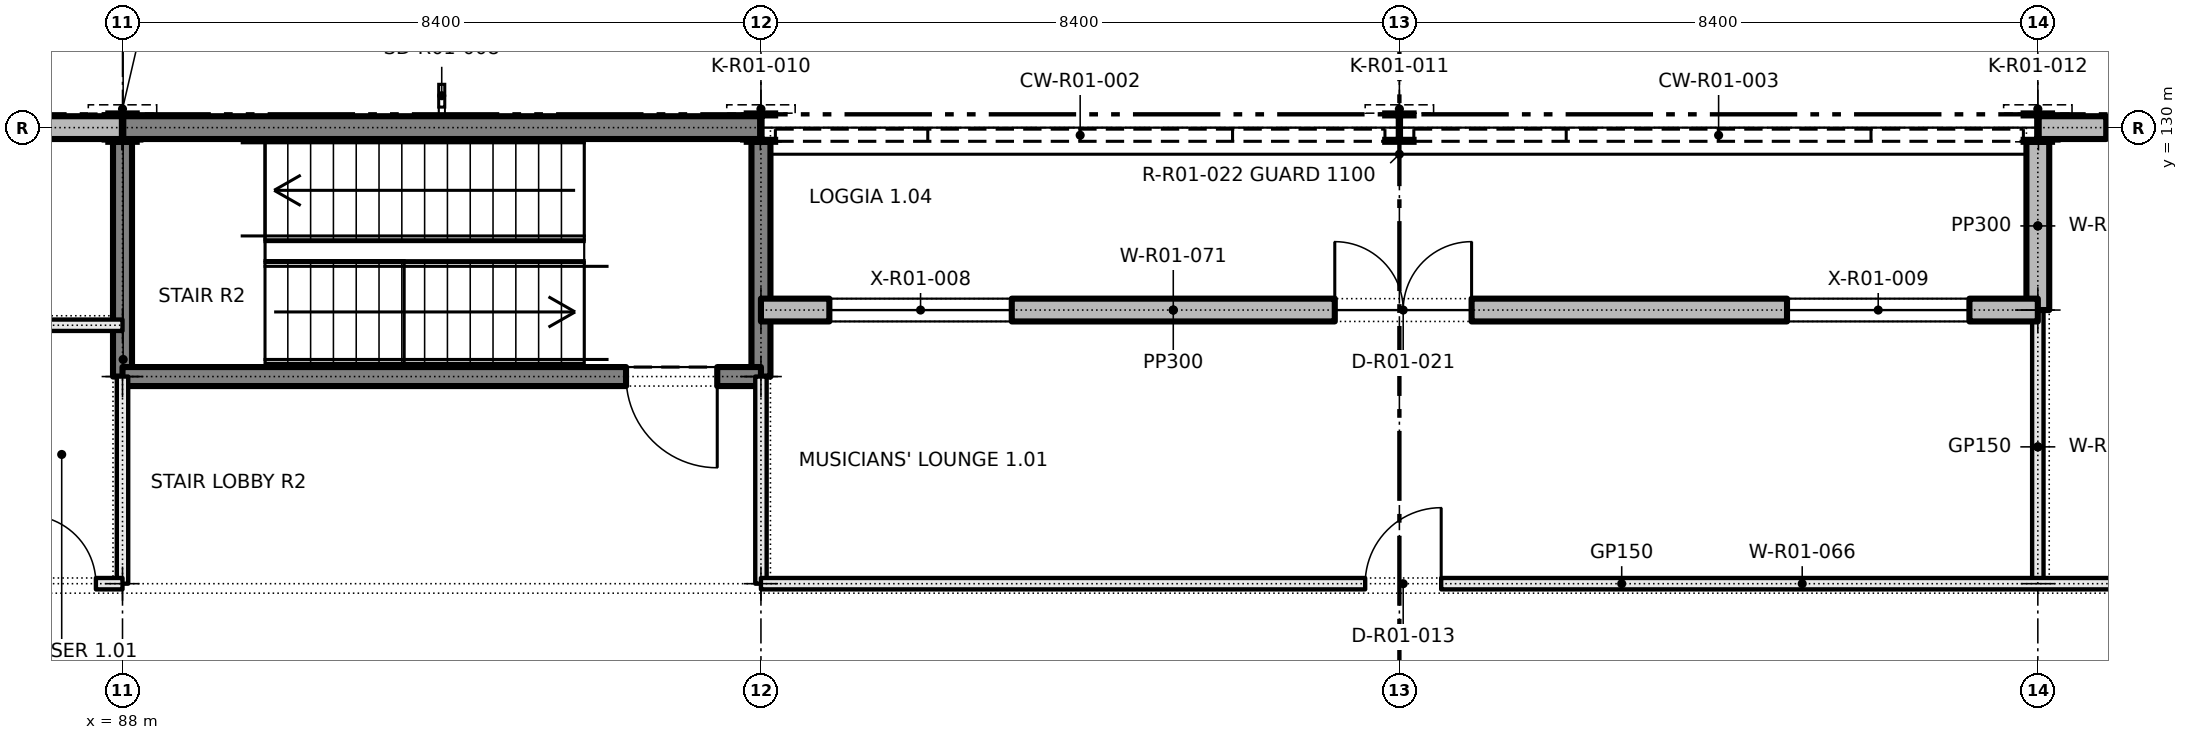
"""IFC4 building model, lengths in metres.
Left out: names, types, materials, properties, quantities, classifications, styles, units other than length and angle.
Written with IfcOpenShell. Run it as: python <this file> out.ifc"""

import sys

from ifc_helpers import new_model, si_unit, direction, frame, frame_2d, origin, origin_2d, place, context, subcontext, project, spatial, rectangle, i_section, extrude, element, fill, save


model = new_model("IFC4")
c1 = context("Model", 3, precision=1e-05, world=origin(), true_north=direction((0.0, 1.0)))
c2 = subcontext(c1, "Body", "Model", "MODEL_VIEW")
j1 = project(units=[si_unit("LENGTHUNIT", "METRE"), si_unit("PLANEANGLEUNIT", "RADIAN")], contexts=[c1])
p1 = place(None, origin())
s1 = spatial("IfcSite", under=j1, at=p1, CompositionType="ELEMENT")
p2 = place(p1, origin())
s2 = spatial("IfcBuilding", under=s1, at=p2, CompositionType="ELEMENT")
p3 = place(p2, frame((0.0, 0.0, 5.4)))
s3 = spatial("IfcBuildingStorey", under=s2, at=p3, CompositionType="ELEMENT", Elevation=5.4)
for number, where, z_axis, x_axis in (
    (1, (88.0, 130.0, 0.0), (0.0, 0.0, 1.0), (1.0, 0.0, 0.0)),
    (2, (96.4, 130.0, 0.0), (0.0, 0.0, 1.0), (1.0, 0.0, 0.0)),
    (3, (104.8, 130.0, 0.0), (0.0, 0.0, 1.0), (1.0, 0.0, 0.0)),
    (4, (113.2, 130.0, 0.0), (0.0, 0.0, 1.0), (1.0, 0.0, 0.0)),
):
    element("IfcColumn", number, at=place(p3, frame(where, z_axis=z_axis, x_axis=x_axis)), inside=s3, PredefinedType="COLUMN", context=c2, shape_type="SweptSolid", body=[
        extrude(i_section(OverallWidth=0.373, OverallDepth=0.373, WebThickness=0.016, FlangeThickness=0.026, FilletRadius=0.015, at=origin_2d()), origin(), (0.0, 0.0, 1.0), 4.8),
    ])
for number, where, z_axis, x_axis in (
    (5, (88.0, 126.725, 0.0), (0.0, 0.0, 1.0), (0.0, 1.0, 0.0)),
    (6, (96.4, 126.725, 0.0), (0.0, 0.0, 1.0), (0.0, 1.0, 0.0)),
):
    element("IfcWall", number, at=place(p3, frame(where, z_axis=z_axis, x_axis=x_axis)), inside=s3, PredefinedType="SHEAR", context=c2, shape_type="SweptSolid", body=[
        extrude(rectangle(XDim=3.088, YDim=0.25, at=frame_2d((1.544, 0.0))), origin(), (0.0, 0.0, 1.0), 4.8),
    ])
p4 = place(p3, frame((88.0, 126.725, 0.0), z_axis=(0.0, 0.0, 1.0), x_axis=(1.0, 0.0, 0.0)))
e7 = element("IfcWall", 7, at=p4, inside=s3, PredefinedType="SHEAR", context=c2, shape_type="SweptSolid", body=[
    extrude(rectangle(XDim=8.4, YDim=0.25, at=frame_2d((4.2, 0.0))), origin(), (0.0, 0.0, 1.0), 4.8),
])
p5 = place(p4, frame((6.625, 0.0, 0.0)))
e8 = element("IfcOpeningElement", 8, at=p5, cuts=e7, PredefinedType="OPENING", context=c2, shape_type="SweptSolid", body=[
    extrude(rectangle(XDim=1.2, YDim=2.1, at=frame_2d((0.6, 1.05))), frame((0.0, 0.135, 0.0), z_axis=(0.0, -1.0, 0.0), x_axis=(1.0, 0.0, 0.0)), (0.0, 0.0, 1.0), 0.27),
])
p6 = place(p3, frame((87.992, 130.0, 0.0), z_axis=(0.0, 0.0, 1.0), x_axis=(1.0, 0.0, 0.0)))
e9 = element("IfcWall", 9, at=p6, inside=s3, PredefinedType="SHEAR", context=c2, shape_type="SweptSolid", body=[
    extrude(rectangle(XDim=8.4, YDim=0.3, at=frame_2d((4.2, 0.0))), origin(), (0.0, 0.0, 1.0), 4.8),
])
p7 = place(p3, frame((79.592, 130.0, 0.0), z_axis=(0.0, 0.0, 1.0), x_axis=(1.0, 0.0, 0.0)))
e10 = element("IfcWall", 10, at=p7, inside=s3, PredefinedType="SOLIDWALL", context=c2, shape_type="SweptSolid", body=[
    extrude(rectangle(XDim=8.417, YDim=0.3, at=frame_2d((4.208, 0.0))), origin(), (0.0, 0.0, 1.0), 4.008),
])
p8 = place(p3, frame((113.208, 130.0, 0.0), z_axis=(0.0, 0.0, 1.0), x_axis=(1.0, 0.0, 0.0)))
e11 = element("IfcWall", 11, at=p8, inside=s3, PredefinedType="SOLIDWALL", context=c2, shape_type="SweptSolid", body=[
    extrude(rectangle(XDim=8.384, YDim=0.3, at=frame_2d((4.192, 0.0))), origin(), (0.0, 0.0, 1.0), 4.008),
])
p9 = place(p8, frame((0.892, 0.0, 0.95)))
e12 = element("IfcOpeningElement", 12, at=p9, cuts=e11, PredefinedType="OPENING", context=c2, shape_type="SweptSolid", body=[
    extrude(rectangle(XDim=2.4, YDim=1.8, at=frame_2d((1.2, 0.9))), frame((0.0, 0.16, 0.0), z_axis=(0.0, -1.0, 0.0), x_axis=(1.0, 0.0, 0.0)), (0.0, 0.0, 1.0), 0.32),
])
p10 = place(p8, frame((5.092, 0.0, 0.95)))
e13 = element("IfcOpeningElement", 13, at=p10, cuts=e11, PredefinedType="OPENING", context=c2, shape_type="SweptSolid", body=[
    extrude(rectangle(XDim=2.4, YDim=1.8, at=frame_2d((1.2, 0.9))), frame((0.0, 0.16, 0.0), z_axis=(0.0, -1.0, 0.0), x_axis=(1.0, 0.0, 0.0)), (0.0, 0.0, 1.0), 0.32),
])
for number, where, z_axis, x_axis in (
    (14, (88.0, 124.0, 0.0), (0.0, 0.0, 1.0), (0.0, 1.0, 0.0)),
    (15, (96.4, 124.0, 0.0), (0.0, 0.0, 1.0), (0.0, 1.0, 0.0)),
):
    element("IfcWall", number, at=place(p3, frame(where, z_axis=z_axis, x_axis=x_axis)), inside=s3, PredefinedType="PARTITIONING", context=c2, shape_type="SweptSolid", body=[
        extrude(rectangle(XDim=2.725, YDim=0.15, at=frame_2d((1.363, 0.0))), origin(), (0.0, 0.0, 1.0), 4.087),
    ])
p11 = place(p3, frame((113.2, 124.0, 0.0), z_axis=(0.0, 0.0, 1.0), x_axis=(0.0, 1.0, 0.0)))
e16 = element("IfcWall", 16, at=p11, inside=s3, PredefinedType="PARTITIONING", context=c2, shape_type="SweptSolid", body=[
    extrude(rectangle(XDim=3.6, YDim=0.15, at=frame_2d((1.8, 0.0))), origin(), (0.0, 0.0, 1.0), 4.087),
])
p12 = place(p3, frame((113.2, 127.6, 0.0), z_axis=(0.0, 0.0, 1.0), x_axis=(0.0, 1.0, 0.0)))
e17 = element("IfcWall", 17, at=p12, inside=s3, PredefinedType="SOLIDWALL", context=c2, shape_type="SweptSolid", body=[
    extrude(rectangle(XDim=2.213, YDim=0.3, at=frame_2d((1.106, 0.0))), origin(), (0.0, 0.0, 1.0), 4.087),
])
p13 = place(p3, frame((96.4, 124.0, 0.0), z_axis=(0.0, 0.0, 1.0), x_axis=(1.0, 0.0, 0.0)))
e18 = element("IfcWall", 18, at=p13, inside=s3, PredefinedType="PARTITIONING", context=c2, shape_type="SweptSolid", body=[
    extrude(rectangle(XDim=25.2, YDim=0.15, at=frame_2d((12.6, 0.0))), origin(), (0.0, 0.0, 1.0), 4.8),
])
p14 = place(p13, frame((7.95, 0.0, 0.0)))
e19 = element("IfcOpeningElement", 19, at=p14, cuts=e18, PredefinedType="OPENING", context=c2, shape_type="SweptSolid", body=[
    extrude(rectangle(XDim=1.0, YDim=2.1, at=frame_2d((0.5, 1.05))), frame((0.0, 0.085, 0.0), z_axis=(0.0, -1.0, 0.0), x_axis=(1.0, 0.0, 0.0)), (0.0, 0.0, 1.0), 0.17),
])
p15 = place(p13, frame((18.45, 0.0, 0.0)))
e20 = element("IfcOpeningElement", 20, at=p15, cuts=e18, PredefinedType="OPENING", context=c2, shape_type="SweptSolid", body=[
    extrude(rectangle(XDim=1.0, YDim=2.1, at=frame_2d((0.5, 1.05))), frame((0.0, 0.085, 0.0), z_axis=(0.0, -1.0, 0.0), x_axis=(1.0, 0.0, 0.0)), (0.0, 0.0, 1.0), 0.17),
])
p16 = place(p13, frame((22.55, 0.0, 0.0)))
e21 = element("IfcOpeningElement", 21, at=p16, cuts=e18, PredefinedType="OPENING", context=c2, shape_type="SweptSolid", body=[
    extrude(rectangle(XDim=1.0, YDim=2.1, at=frame_2d((0.5, 1.05))), frame((0.0, 0.085, 0.0), z_axis=(0.0, -1.0, 0.0), x_axis=(1.0, 0.0, 0.0)), (0.0, 0.0, 1.0), 0.17),
])
p17 = place(p3, frame((86.4, 124.0, 0.0), z_axis=(0.0, 0.0, 1.0), x_axis=(1.0, 0.0, 0.0)))
e22 = element("IfcWall", 22, at=p17, inside=s3, PredefinedType="PARTITIONING", context=c2, shape_type="SweptSolid", body=[
    extrude(rectangle(XDim=1.6, YDim=0.15, at=frame_2d((0.8, 0.0))), origin(), (0.0, 0.0, 1.0), 4.8),
])
p18 = place(p17, frame((0.35, 0.0, 0.0)))
e23 = element("IfcOpeningElement", 23, at=p18, cuts=e22, PredefinedType="OPENING", context=c2, shape_type="SweptSolid", body=[
    extrude(rectangle(XDim=0.9, YDim=2.1, at=frame_2d((0.45, 1.05))), frame((0.0, 0.085, 0.0), z_axis=(0.0, -1.0, 0.0), x_axis=(1.0, 0.0, 0.0)), (0.0, 0.0, 1.0), 0.17),
])
p19 = place(p3, frame((86.4, 127.4, 0.0), z_axis=(0.0, 0.0, 1.0), x_axis=(1.0, 0.0, 0.0)))
e24 = element("IfcWall", 24, at=p19, inside=s3, PredefinedType="PARTITIONING", context=c2, shape_type="SweptSolid", body=[
    extrude(rectangle(XDim=1.6, YDim=0.15, at=frame_2d((0.8, 0.0))), origin(), (0.0, 0.0, 1.0), 4.8),
])
p20 = place(p3, frame((96.4, 127.6, 0.0), z_axis=(0.0, 0.0, 1.0), x_axis=(1.0, 0.0, 0.0)))
e25 = element("IfcWall", 25, at=p20, inside=s3, PredefinedType="SOLIDWALL", context=c2, shape_type="SweptSolid", body=[
    extrude(rectangle(XDim=16.8, YDim=0.3, at=frame_2d((8.4, 0.0))), origin(), (0.0, 0.0, 1.0), 4.8),
])
p21 = place(p20, frame((7.55, 0.0, 0.0)))
e26 = element("IfcOpeningElement", 26, at=p21, cuts=e25, PredefinedType="OPENING", context=c2, shape_type="SweptSolid", body=[
    extrude(rectangle(XDim=1.8, YDim=2.1, at=frame_2d((0.9, 1.05))), frame((0.0, 0.16, 0.0), z_axis=(0.0, -1.0, 0.0), x_axis=(1.0, 0.0, 0.0)), (0.0, 0.0, 1.0), 0.32),
])
p22 = place(p20, frame((0.9, 0.0, 0.95)))
e27 = element("IfcOpeningElement", 27, at=p22, cuts=e25, PredefinedType="OPENING", context=c2, shape_type="SweptSolid", body=[
    extrude(rectangle(XDim=2.4, YDim=1.8, at=frame_2d((1.2, 0.9))), frame((0.0, 0.16, 0.0), z_axis=(0.0, -1.0, 0.0), x_axis=(1.0, 0.0, 0.0)), (0.0, 0.0, 1.0), 0.32),
])
p23 = place(p20, frame((13.5, 0.0, 0.95)))
e28 = element("IfcOpeningElement", 28, at=p23, cuts=e25, PredefinedType="OPENING", context=c2, shape_type="SweptSolid", body=[
    extrude(rectangle(XDim=2.4, YDim=1.8, at=frame_2d((1.2, 0.9))), frame((0.0, 0.16, 0.0), z_axis=(0.0, -1.0, 0.0), x_axis=(1.0, 0.0, 0.0)), (0.0, 0.0, 1.0), 0.32),
])
p24 = place(p9, origin())
e29 = element("IfcWindow", 29, at=p24, inside=s3, PartitioningType="DOUBLE_PANEL_VERTICAL", PredefinedType="WINDOW", context=c2, shape_type="SweptSolid", body=[
    extrude(rectangle(XDim=2.4, YDim=1.8, at=frame_2d((1.2, 0.9))), frame((0.0, 0.03, 0.0), z_axis=(0.0, -1.0, 0.0), x_axis=(1.0, 0.0, 0.0)), (0.0, 0.0, 1.0), 0.06),
])
fill(e12, e29)
p25 = place(p5, frame((1.2, 0.0, 0.0), z_axis=(0.0, 0.0, 1.0), x_axis=(-1.0, 0.0, 0.0)))
e30 = element("IfcDoor", 30, at=p25, inside=s3, OperationType="SINGLE_SWING_LEFT", PredefinedType="DOOR", context=c2, shape_type="SweptSolid", body=[
    extrude(rectangle(XDim=1.2, YDim=2.1, at=frame_2d((0.6, 1.05))), frame((0.0, 0.025, 0.0), z_axis=(0.0, -1.0, 0.0), x_axis=(1.0, 0.0, 0.0)), (0.0, 0.0, 1.0), 0.05),
])
fill(e8, e30)
p26 = place(p18, origin())
e31 = element("IfcDoor", 31, at=p26, inside=s3, OperationType="SINGLE_SWING_LEFT", PredefinedType="DOOR", context=c2, shape_type="SweptSolid", body=[
    extrude(rectangle(XDim=0.9, YDim=2.1, at=frame_2d((0.45, 1.05))), frame((0.0, 0.025, 0.0), z_axis=(0.0, -1.0, 0.0), x_axis=(1.0, 0.0, 0.0)), (0.0, 0.0, 1.0), 0.05),
])
fill(e23, e31)
p27 = place(p14, origin())
e32 = element("IfcDoor", 32, at=p27, inside=s3, OperationType="SINGLE_SWING_RIGHT", PredefinedType="DOOR", context=c2, shape_type="SweptSolid", body=[
    extrude(rectangle(XDim=1.0, YDim=2.1, at=frame_2d((0.5, 1.05))), frame((0.0, 0.025, 0.0), z_axis=(0.0, -1.0, 0.0), x_axis=(1.0, 0.0, 0.0)), (0.0, 0.0, 1.0), 0.05),
])
fill(e19, e32)
p28 = place(p21, origin())
e33 = element("IfcDoor", 33, at=p28, inside=s3, OperationType="DOUBLE_DOOR_SINGLE_SWING", PredefinedType="DOOR", context=c2, shape_type="SweptSolid", body=[
    extrude(rectangle(XDim=1.8, YDim=2.1, at=frame_2d((0.9, 1.05))), frame((0.0, 0.025, 0.0), z_axis=(0.0, -1.0, 0.0), x_axis=(1.0, 0.0, 0.0)), (0.0, 0.0, 1.0), 0.05),
])
fill(e26, e33)
p29 = place(p22, origin())
e34 = element("IfcWindow", 34, at=p29, inside=s3, PartitioningType="DOUBLE_PANEL_VERTICAL", PredefinedType="WINDOW", context=c2, shape_type="SweptSolid", body=[
    extrude(rectangle(XDim=2.4, YDim=1.8, at=frame_2d((1.2, 0.9))), frame((0.0, 0.03, 0.0), z_axis=(0.0, -1.0, 0.0), x_axis=(1.0, 0.0, 0.0)), (0.0, 0.0, 1.0), 0.06),
])
fill(e27, e34)
p30 = place(p23, origin())
e35 = element("IfcWindow", 35, at=p30, inside=s3, PartitioningType="DOUBLE_PANEL_VERTICAL", PredefinedType="WINDOW", context=c2, shape_type="SweptSolid", body=[
    extrude(rectangle(XDim=2.4, YDim=1.8, at=frame_2d((1.2, 0.9))), frame((0.0, 0.03, 0.0), z_axis=(0.0, -1.0, 0.0), x_axis=(1.0, 0.0, 0.0)), (0.0, 0.0, 1.0), 0.06),
])
fill(e28, e35)
save(model, sys.argv[1])
